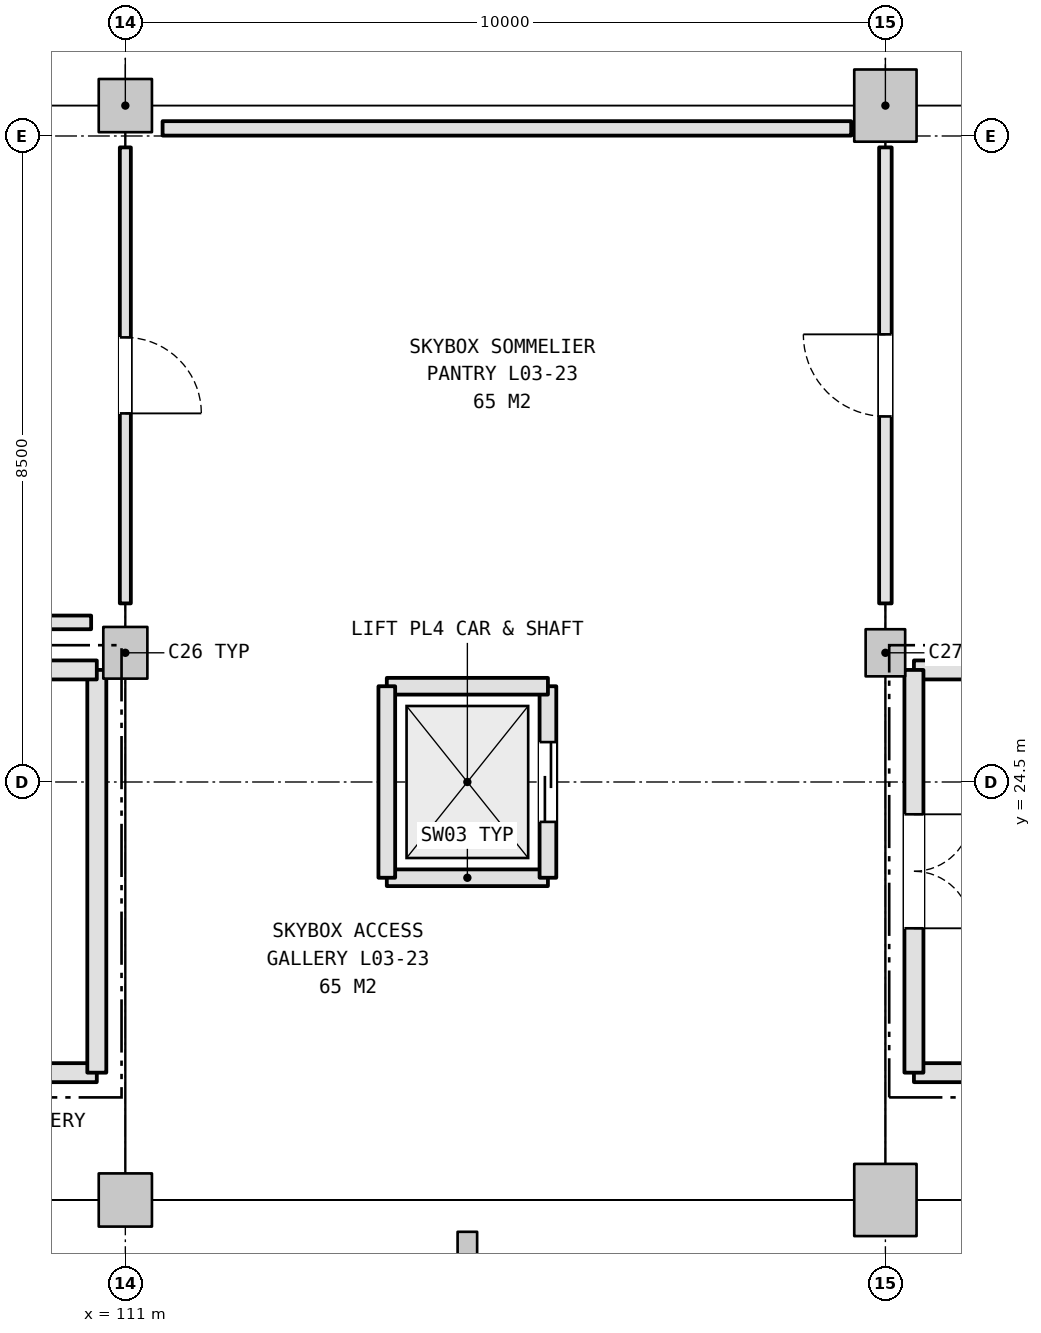
"""IFC4 building model, lengths in metres.
Left out: names, types, materials, properties, quantities, classifications, styles, units other than length and angle.
Written with IfcOpenShell. Run it as: python <this file> out.ifc"""

import sys

from ifc_helpers import new_model, si_unit, direction, frame, frame_2d, origin, origin_2d, place, context, subcontext, project, spatial, rectangle, i_section, extrude, element, fill, save


model = new_model("IFC4")
c1 = context("Model", 3, precision=1e-05, world=origin(), true_north=direction((0.0, 1.0)))
c2 = subcontext(c1, "Body", "Model", "MODEL_VIEW")
j1 = project(units=[si_unit("LENGTHUNIT", "METRE"), si_unit("PLANEANGLEUNIT", "RADIAN")], contexts=[c1])
p1 = place(None, origin())
s1 = spatial("IfcSite", under=j1, at=p1, CompositionType="ELEMENT")
p2 = place(p1, origin())
s2 = spatial("IfcBuilding", under=s1, at=p2, CompositionType="ELEMENT")
p3 = place(p2, frame((0.0, 0.0, 16.2)))
s3 = spatial("IfcBuildingStorey", under=s2, at=p3, CompositionType="ELEMENT", Elevation=16.2)
p4 = place(p3, frame((111.0, 33.4, 0.0), z_axis=(0.0, 0.0, 1.0), x_axis=(1.0, 0.0, 0.0)))
e1 = element("IfcColumn", 1, at=p4, inside=s3, PredefinedType="COLUMN", context=c2, shape_type="SweptSolid", body=[
    extrude(rectangle(XDim=0.7, YDim=0.7, at=origin_2d()), origin(), (0.0, 0.0, 1.0), 5.4),
])
p5 = place(p3, frame((111.0, 26.2, 0.0), z_axis=(0.0, 0.0, 1.0), x_axis=(1.0, 0.0, 0.0)))
e2 = element("IfcColumn", 2, at=p5, inside=s3, PredefinedType="COLUMN", context=c2, shape_type="SweptSolid", body=[
    extrude(rectangle(XDim=0.58, YDim=0.68, at=origin_2d()), origin(), (0.0, 0.0, 1.0), 5.4),
])
p6 = place(p3, frame((111.0, 19.0, 0.0), z_axis=(0.0, 0.0, 1.0), x_axis=(1.0, 0.0, 0.0)))
e3 = element("IfcColumn", 3, at=p6, inside=s3, PredefinedType="COLUMN", context=c2, shape_type="SweptSolid", body=[
    extrude(rectangle(XDim=0.7, YDim=0.7, at=origin_2d()), origin(), (0.0, 0.0, 1.0), 5.4),
])
p7 = place(p3, frame((121.0, 33.4, 0.0), z_axis=(0.0, 0.0, 1.0), x_axis=(1.0, 0.0, 0.0)))
e4 = element("IfcColumn", 4, at=p7, inside=s3, PredefinedType="COLUMN", context=c2, shape_type="SweptSolid", body=[
    extrude(rectangle(XDim=0.82, YDim=0.95, at=origin_2d()), origin(), (0.0, 0.0, 1.0), 5.4),
])
p8 = place(p3, frame((121.0, 26.2, 0.0), z_axis=(0.0, 0.0, 1.0), x_axis=(1.0, 0.0, 0.0)))
e5 = element("IfcColumn", 5, at=p8, inside=s3, PredefinedType="COLUMN", context=c2, shape_type="SweptSolid", body=[
    extrude(rectangle(XDim=0.52, YDim=0.62, at=origin_2d()), origin(), (0.0, 0.0, 1.0), 5.4),
])
p9 = place(p3, frame((121.0, 19.0, 0.0), z_axis=(0.0, 0.0, 1.0), x_axis=(1.0, 0.0, 0.0)))
e6 = element("IfcColumn", 6, at=p9, inside=s3, PredefinedType="COLUMN", context=c2, shape_type="SweptSolid", body=[
    extrude(rectangle(XDim=0.82, YDim=0.95, at=origin_2d()), origin(), (0.0, 0.0, 1.0), 5.4),
])
p10 = place(p3, frame((115.5, 18.4, 0.0), z_axis=(0.0, 0.0, 1.0), x_axis=(1.0, 0.0, 0.0)))
e7 = element("IfcColumn", 7, at=p10, inside=s3, PredefinedType="COLUMN", context=c2, shape_type="SweptSolid", body=[
    extrude(i_section(OverallWidth=0.257, OverallDepth=0.363, WebThickness=0.013, FlangeThickness=0.022, FilletRadius=0.015, at=origin_2d()), origin(), (0.0, 0.0, 1.0), 5.4),
])
for number, where, z_axis, x_axis in (
    (8, (121.375, 20.675, 0.0), (0.0, 0.0, 1.0), (1.0, 0.0, 0.0)),
    (9, (130.625, 25.975, 0.0), (0.0, 0.0, 1.0), (-1.0, 0.0, 0.0)),
):
    element("IfcWall", number, at=place(p3, frame(where, z_axis=z_axis, x_axis=x_axis)), inside=s3, PredefinedType="SHEAR", context=c2, shape_type="SweptSolid", body=[
        extrude(rectangle(XDim=9.249, YDim=0.25, at=frame_2d((4.625, 0.0))), origin(), (0.0, 0.0, 1.0), 5.14),
    ])
p11 = place(p3, frame((121.375, 25.975, 0.0), z_axis=(0.0, 0.0, 1.0), x_axis=(0.0, -1.0, 0.0)))
e10 = element("IfcWall", 10, at=p11, inside=s3, PredefinedType="SHEAR", context=c2, shape_type="SweptSolid", body=[
    extrude(rectangle(XDim=5.299, YDim=0.25, at=frame_2d((2.65, 0.0))), origin(), (0.0, 0.0, 1.0), 5.14),
])
p12 = place(p11, frame((1.9, 0.0, 0.0)))
e11 = element("IfcOpeningElement", 11, at=p12, cuts=e10, PredefinedType="OPENING", context=c2, shape_type="SweptSolid", body=[
    extrude(rectangle(XDim=1.5, YDim=2.2, at=frame_2d((0.75, 1.1))), frame((0.0, 0.135, 0.0), z_axis=(0.0, -1.0, 0.0), x_axis=(1.0, 0.0, 0.0)), (0.0, 0.0, 1.0), 0.27),
])
p13 = place(p3, frame((101.375, 20.675, 0.0), z_axis=(0.0, 0.0, 1.0), x_axis=(1.0, 0.0, 0.0)))
e12 = element("IfcWall", 12, at=p13, inside=s3, PredefinedType="SHEAR", context=c2, shape_type="SweptSolid", body=[
    extrude(rectangle(XDim=9.249, YDim=0.25, at=frame_2d((4.625, 0.0))), origin(), (0.0, 0.0, 1.0), 5.14),
])
p14 = place(p3, frame((110.625, 20.675, 0.0), z_axis=(0.0, 0.0, 1.0), x_axis=(0.0, 1.0, 0.0)))
e13 = element("IfcWall", 13, at=p14, inside=s3, PredefinedType="SHEAR", context=c2, shape_type="SweptSolid", body=[
    extrude(rectangle(XDim=5.299, YDim=0.25, at=frame_2d((2.65, 0.0))), origin(), (0.0, 0.0, 1.0), 5.14),
])
p15 = place(p3, frame((110.625, 25.975, 0.0), z_axis=(0.0, 0.0, 1.0), x_axis=(-1.0, 0.0, 0.0)))
e14 = element("IfcWall", 14, at=p15, inside=s3, PredefinedType="SHEAR", context=c2, shape_type="SweptSolid", body=[
    extrude(rectangle(XDim=9.249, YDim=0.25, at=frame_2d((4.625, 0.0))), origin(), (0.0, 0.0, 1.0), 5.14),
])
p16 = place(p3, frame((114.44, 23.24, 0.0), z_axis=(0.0, 0.0, 1.0), x_axis=(1.0, 0.0, 0.0)))
e15 = element("IfcWall", 15, at=p16, inside=s3, PredefinedType="SHEAR", context=c2, shape_type="SweptSolid", body=[
    extrude(rectangle(XDim=2.12, YDim=0.22, at=frame_2d((1.06, 0.0))), origin(), (0.0, 0.0, 1.0), 5.14),
])
p17 = place(p3, frame((116.56, 23.24, 0.0), z_axis=(0.0, 0.0, 1.0), x_axis=(0.0, 1.0, 0.0)))
e16 = element("IfcWall", 16, at=p17, inside=s3, PredefinedType="SHEAR", context=c2, shape_type="SweptSolid", body=[
    extrude(rectangle(XDim=2.52, YDim=0.22, at=frame_2d((1.26, 0.0))), origin(), (0.0, 0.0, 1.0), 5.14),
])
p18 = place(p17, frame((0.735, 0.0, 0.0)))
e17 = element("IfcOpeningElement", 17, at=p18, cuts=e16, PredefinedType="OPENING", context=c2, shape_type="SweptSolid", body=[
    extrude(rectangle(XDim=1.05, YDim=2.15, at=frame_2d((0.525, 1.075))), frame((0.0, 0.12, 0.0), z_axis=(0.0, -1.0, 0.0), x_axis=(1.0, 0.0, 0.0)), (0.0, 0.0, 1.0), 0.24),
])
p19 = place(p3, frame((116.56, 25.76, 0.0), z_axis=(0.0, 0.0, 1.0), x_axis=(-1.0, 0.0, 0.0)))
e18 = element("IfcWall", 18, at=p19, inside=s3, PredefinedType="SHEAR", context=c2, shape_type="SweptSolid", body=[
    extrude(rectangle(XDim=2.12, YDim=0.22, at=frame_2d((1.06, 0.0))), origin(), (0.0, 0.0, 1.0), 5.14),
])
p20 = place(p3, frame((114.44, 25.76, 0.0), z_axis=(0.0, 0.0, 1.0), x_axis=(0.0, -1.0, 0.0)))
e19 = element("IfcWall", 19, at=p20, inside=s3, PredefinedType="SHEAR", context=c2, shape_type="SweptSolid", body=[
    extrude(rectangle(XDim=2.52, YDim=0.22, at=frame_2d((1.26, 0.0))), origin(), (0.0, 0.0, 1.0), 5.14),
])
p21 = place(p3, frame((111.0, 32.85, 0.0), z_axis=(0.0, 0.0, 1.0), x_axis=(0.0, -1.0, 0.0)))
e20 = element("IfcWall", 20, at=p21, inside=s3, PredefinedType="PARTITIONING", context=c2, shape_type="SweptSolid", body=[
    extrude(rectangle(XDim=6.0, YDim=0.145, at=frame_2d((3.0, 0.0))), origin(), (0.0, 0.0, 1.0), 4.375),
])
p22 = place(p21, frame((2.5, 0.0, 0.0)))
e21 = element("IfcOpeningElement", 21, at=p22, cuts=e20, PredefinedType="OPENING", context=c2, shape_type="SweptSolid", body=[
    extrude(rectangle(XDim=1.0, YDim=2.1, at=frame_2d((0.5, 1.05))), frame((0.0, 0.083, 0.0), z_axis=(0.0, -1.0, 0.0), x_axis=(1.0, 0.0, 0.0)), (0.0, 0.0, 1.0), 0.165),
])
p23 = place(p3, frame((110.55, 26.6, 0.0), z_axis=(0.0, 0.0, 1.0), x_axis=(-1.0, 0.0, 0.0)))
e22 = element("IfcWall", 22, at=p23, inside=s3, PredefinedType="PARTITIONING", context=c2, shape_type="SweptSolid", body=[
    extrude(rectangle(XDim=9.06, YDim=0.18, at=frame_2d((4.53, 0.0))), origin(), (0.0, 0.0, 1.0), 5.12),
])
p24 = place(p3, frame((121.0, 32.85, 0.0), z_axis=(0.0, 0.0, 1.0), x_axis=(0.0, -1.0, 0.0)))
e23 = element("IfcWall", 23, at=p24, inside=s3, PredefinedType="PARTITIONING", context=c2, shape_type="SweptSolid", body=[
    extrude(rectangle(XDim=6.0, YDim=0.165, at=frame_2d((3.0, 0.0))), origin(), (0.0, 0.0, 1.0), 4.365),
])
p25 = place(p24, frame((2.46, 0.0, 0.0)))
e24 = element("IfcOpeningElement", 24, at=p25, cuts=e23, PredefinedType="OPENING", context=c2, shape_type="SweptSolid", body=[
    extrude(rectangle(XDim=1.08, YDim=2.25, at=frame_2d((0.54, 1.125))), frame((0.0, 0.093, 0.0), z_axis=(0.0, -1.0, 0.0), x_axis=(1.0, 0.0, 0.0)), (0.0, 0.0, 1.0), 0.185),
])
p26 = place(p3, frame((111.49, 33.1, 0.0), z_axis=(0.0, 0.0, 1.0), x_axis=(1.0, 0.0, 0.0)))
e25 = element("IfcWall", 25, at=p26, inside=s3, PredefinedType="PARTITIONING", context=c2, shape_type="SweptSolid", body=[
    extrude(rectangle(XDim=9.06, YDim=0.19, at=frame_2d((4.53, 0.0))), origin(), (0.0, 0.0, 1.0), 4.505),
])
p27 = place(p12, origin())
e26 = element("IfcDoor", 26, at=p27, inside=s3, OperationType="DOUBLE_DOOR_SINGLE_SWING", PredefinedType="DOOR", context=c2, shape_type="SweptSolid", body=[
    extrude(rectangle(XDim=1.5, YDim=2.2, at=frame_2d((0.75, 1.1))), frame((0.0, 0.025, 0.0), z_axis=(0.0, -1.0, 0.0), x_axis=(1.0, 0.0, 0.0)), (0.0, 0.0, 1.0), 0.05),
])
fill(e11, e26)
p28 = place(p18, origin())
e27 = element("IfcDoor", 27, at=p28, inside=s3, OperationType="DOUBLE_DOOR_SLIDING", PredefinedType="DOOR", context=c2, shape_type="SweptSolid", body=[
    extrude(rectangle(XDim=1.05, YDim=2.15, at=frame_2d((0.525, 1.075))), frame((0.0, 0.025, 0.0), z_axis=(0.0, -1.0, 0.0), x_axis=(1.0, 0.0, 0.0)), (0.0, 0.0, 1.0), 0.05),
])
fill(e17, e27)
p29 = place(p22, origin())
e28 = element("IfcDoor", 28, at=p29, inside=s3, OperationType="SINGLE_SWING_RIGHT", PredefinedType="DOOR", context=c2, shape_type="SweptSolid", body=[
    extrude(rectangle(XDim=1.0, YDim=2.1, at=frame_2d((0.5, 1.05))), frame((0.0, 0.025, 0.0), z_axis=(0.0, -1.0, 0.0), x_axis=(1.0, 0.0, 0.0)), (0.0, 0.0, 1.0), 0.05),
])
fill(e21, e28)
p30 = place(p25, frame((1.08, 0.0, 0.0), z_axis=(0.0, 0.0, 1.0), x_axis=(-1.0, 0.0, 0.0)))
e29 = element("IfcDoor", 29, at=p30, inside=s3, OperationType="SINGLE_SWING_LEFT", PredefinedType="DOOR", context=c2, shape_type="SweptSolid", body=[
    extrude(rectangle(XDim=1.08, YDim=2.25, at=frame_2d((0.54, 1.125))), frame((0.0, 0.025, 0.0), z_axis=(0.0, -1.0, 0.0), x_axis=(1.0, 0.0, 0.0)), (0.0, 0.0, 1.0), 0.05),
])
fill(e24, e29)
save(model, sys.argv[1])
